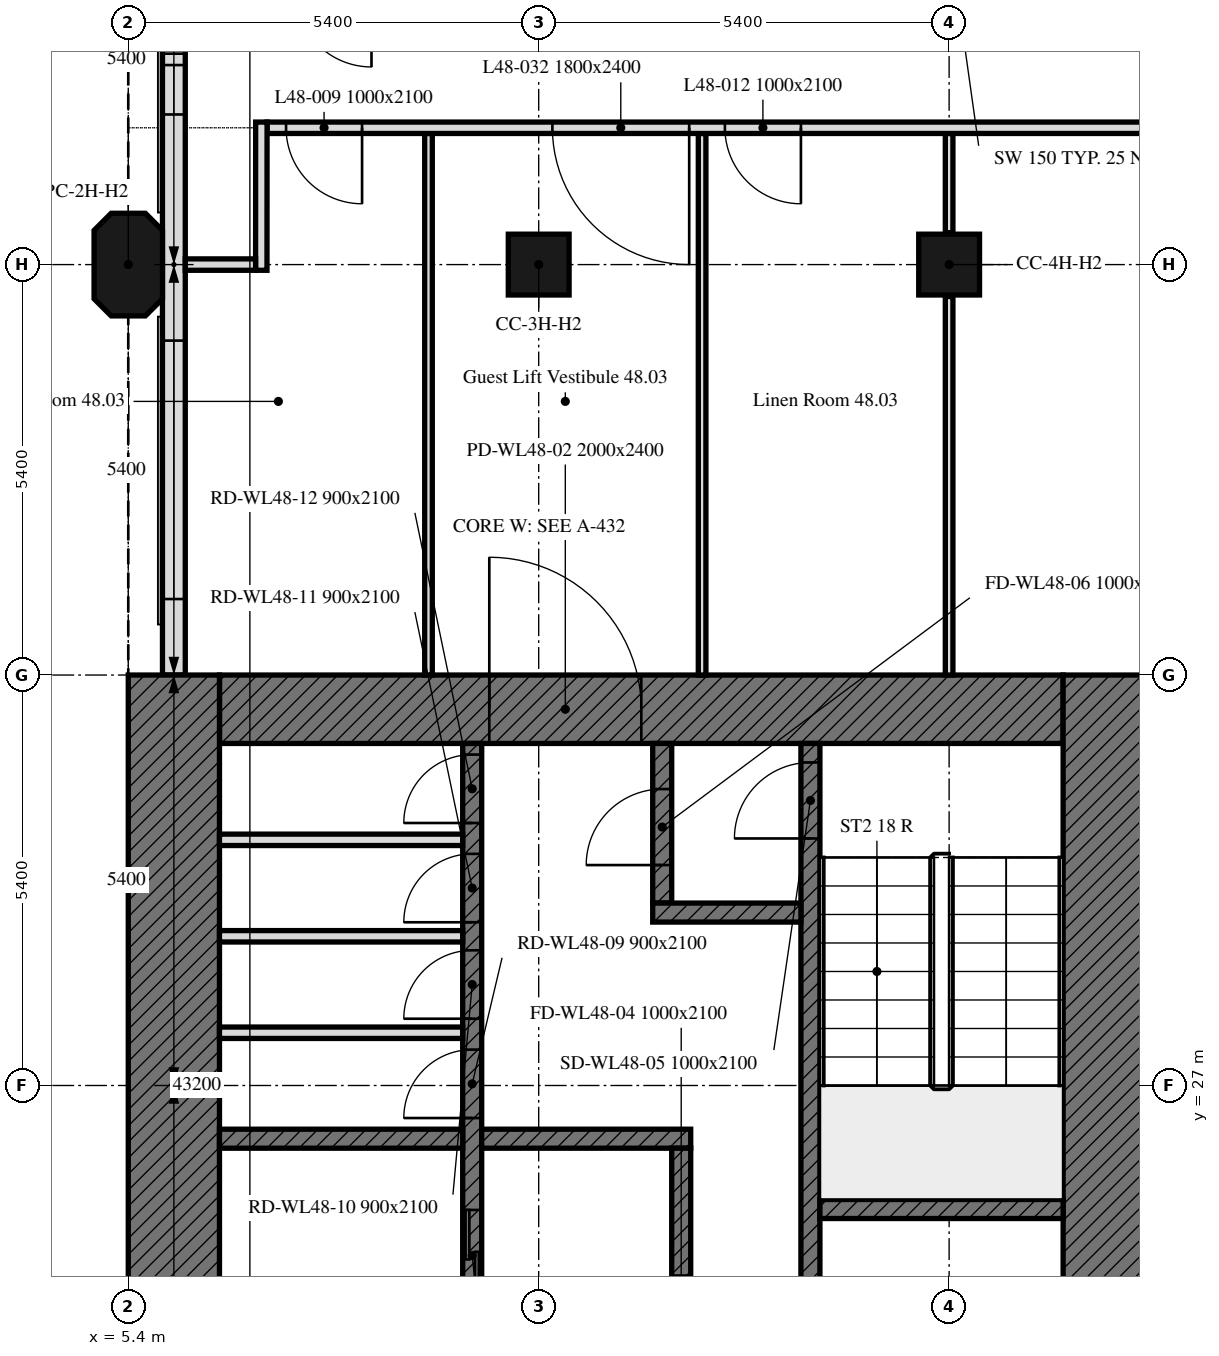
"""IFC4 building model, lengths in metres.
Left out: names, types, materials, properties, quantities, classifications, styles, units other than length and angle.
Written with IfcOpenShell. Run it as: python <this file> out.ifc"""

import sys

from ifc_helpers import new_model, si_unit, direction, frame, frame_2d, origin, origin_2d, place, context, subcontext, project, spatial, polyline, rectangle, outline, extrude, element, fill, save


model = new_model("IFC4")
c1 = context("Model", 3, precision=1e-05, world=origin(), true_north=direction((0.0, 1.0)))
c2 = subcontext(c1, "Body", "Model", "MODEL_VIEW")
j1 = project(units=[si_unit("LENGTHUNIT", "METRE"), si_unit("PLANEANGLEUNIT", "RADIAN")], contexts=[c1])
p1 = place(None, origin())
s1 = spatial("IfcSite", under=j1, at=p1, CompositionType="ELEMENT")
p2 = place(p1, origin())
s2 = spatial("IfcBuilding", under=s1, at=p2, CompositionType="ELEMENT")
p3 = place(p2, frame((0.0, 0.0, 197.2)))
s3 = spatial("IfcBuildingStorey", under=s2, at=p3, CompositionType="ELEMENT", Elevation=197.2)
p4 = place(p3, frame((5.4, 37.8, 0.0), z_axis=(0.0, 0.0, 1.0), x_axis=(0.0, 1.0, 0.0)))
e1 = element("IfcColumn", 1, at=p4, inside=s3, PredefinedType="COLUMN", context=c2, shape_type="SweptSolid", body=[
    extrude(outline(polyline([(-0.45, -0.45), (0.45, -0.45), (0.675, -0.225), (0.675, 0.225), (0.45, 0.45), (-0.45, 0.45), (-0.675, 0.225), (-0.675, -0.225), (-0.45, -0.45)])), origin(), (0.0, 0.0, 1.0), 3.0),
])
for number, where, z_axis, x_axis in (
    (2, (10.8, 37.8, 0.0), (0.0, 0.0, 1.0), (1.0, 0.0, 0.0)),
    (3, (16.2, 37.8, 0.0), (0.0, 0.0, 1.0), (1.0, 0.0, 0.0)),
):
    element("IfcColumn", number, at=place(p3, frame(where, z_axis=z_axis, x_axis=x_axis)), inside=s3, PredefinedType="COLUMN", context=c2, shape_type="SweptSolid", body=[
        extrude(rectangle(XDim=0.8, YDim=0.8, at=origin_2d()), origin(), (0.0, 0.0, 1.0), 3.0),
    ])
p5 = place(p3, frame((6.0, 43.014, 0.0), z_axis=(0.0, 0.0, 1.0), x_axis=(0.0, -1.0, 0.0)))
e4 = element("IfcWall", 4, at=p5, inside=s3, PredefinedType="SOLIDWALL", context=c2, shape_type="SweptSolid", body=[
    extrude(rectangle(XDim=10.614, YDim=0.3, at=frame_2d((5.307, 0.0))), origin(), (0.0, 0.0, 1.0), 3.0),
])
p6 = place(p5, frame((1.789, 0.0, 0.9)))
e5 = element("IfcOpeningElement", 5, at=p6, cuts=e4, PredefinedType="OPENING", context=c2, shape_type="SweptSolid", body=[
    extrude(rectangle(XDim=0.65, YDim=1.7, at=frame_2d((0.325, 0.85))), frame((0.0, 0.16, 0.0), z_axis=(0.0, -1.0, 0.0), x_axis=(1.0, 0.0, 0.0)), (0.0, 0.0, 1.0), 0.32),
])
p7 = place(p5, frame((2.589, 0.0, 0.9)))
e6 = element("IfcOpeningElement", 6, at=p7, cuts=e4, PredefinedType="OPENING", context=c2, shape_type="SweptSolid", body=[
    extrude(rectangle(XDim=0.65, YDim=1.7, at=frame_2d((0.325, 0.85))), frame((0.0, 0.16, 0.0), z_axis=(0.0, -1.0, 0.0), x_axis=(1.0, 0.0, 0.0)), (0.0, 0.0, 1.0), 0.32),
])
p8 = place(p5, frame((6.214, 0.0, 0.9)))
e7 = element("IfcOpeningElement", 7, at=p8, cuts=e4, PredefinedType="OPENING", context=c2, shape_type="SweptSolid", body=[
    extrude(rectangle(XDim=3.4, YDim=1.7, at=frame_2d((1.7, 0.85))), frame((0.0, 0.16, 0.0), z_axis=(0.0, -1.0, 0.0), x_axis=(1.0, 0.0, 0.0)), (0.0, 0.0, 1.0), 0.32),
])
p9 = place(p3, frame((6.6, 31.95, 0.0), z_axis=(0.0, 0.0, 1.0), x_axis=(1.0, 0.0, 0.0)))
e8 = element("IfcWall", 8, at=p9, inside=s3, PredefinedType="SOLIDWALL", context=c2, shape_type="SweptSolid", body=[
    extrude(rectangle(XDim=11.1, YDim=0.9, at=frame_2d((5.55, 0.0))), origin(), (0.0, 0.0, 1.0), 3.0),
])
p10 = place(p9, frame((3.55, 0.0, 0.0)))
e9 = element("IfcOpeningElement", 9, at=p10, cuts=e8, PredefinedType="OPENING", context=c2, shape_type="SweptSolid", body=[
    extrude(rectangle(XDim=2.0, YDim=2.4, at=frame_2d((1.0, 1.2))), frame((0.0, 0.45, 0.0), z_axis=(0.0, -1.0, 0.0), x_axis=(1.0, 0.0, 0.0)), (0.0, 0.0, 1.0), 0.9),
])
for number, where, z_axis, x_axis in (
    (10, (6.0, 16.2, 0.0), (0.0, 0.0, 1.0), (0.0, 1.0, 0.0)),
    (11, (18.3, 32.4, 0.0), (0.0, 0.0, 1.0), (0.0, -1.0, 0.0)),
):
    element("IfcWall", number, at=place(p3, frame(where, z_axis=z_axis, x_axis=x_axis)), inside=s3, PredefinedType="SOLIDWALL", context=c2, shape_type="SweptSolid", body=[
        extrude(rectangle(XDim=16.2, YDim=1.2, at=frame_2d((8.1, 0.0))), origin(), (0.0, 0.0, 1.0), 3.0),
    ])
p11 = place(p3, frame((9.925, 17.1, 0.0), z_axis=(0.0, 0.0, 1.0), x_axis=(0.0, 1.0, 0.0)))
e12 = element("IfcWall", 12, at=p11, inside=s3, PredefinedType="SOLIDWALL", context=c2, shape_type="SweptSolid", body=[
    extrude(rectangle(XDim=14.4, YDim=0.25, at=frame_2d((7.2, 0.0))), origin(), (0.0, 0.0, 1.0), 3.0),
])
p12 = place(p11, frame((4.6, 0.0, 0.0)))
e13 = element("IfcOpeningElement", 13, at=p12, cuts=e12, PredefinedType="OPENING", context=c2, shape_type="SweptSolid", body=[
    extrude(rectangle(XDim=1.0, YDim=2.1, at=frame_2d((0.5, 1.05))), frame((0.0, 0.125, 0.0), z_axis=(0.0, -1.0, 0.0), x_axis=(1.0, 0.0, 0.0)), (0.0, 0.0, 1.0), 0.25),
])
p13 = place(p11, frame((7.062, 0.0, 0.0)))
e14 = element("IfcOpeningElement", 14, at=p13, cuts=e12, PredefinedType="OPENING", context=c2, shape_type="SweptSolid", body=[
    extrude(rectangle(XDim=1.2, YDim=2.1, at=frame_2d((0.6, 1.05))), frame((0.0, 0.125, 0.0), z_axis=(0.0, -1.0, 0.0), x_axis=(1.0, 0.0, 0.0)), (0.0, 0.0, 1.0), 0.25),
])
p14 = place(p11, frame((9.472, 0.0, 0.0)))
e15 = element("IfcOpeningElement", 15, at=p14, cuts=e12, PredefinedType="OPENING", context=c2, shape_type="SweptSolid", body=[
    extrude(rectangle(XDim=0.9, YDim=2.1, at=frame_2d((0.45, 1.05))), frame((0.0, 0.125, 0.0), z_axis=(0.0, -1.0, 0.0), x_axis=(1.0, 0.0, 0.0)), (0.0, 0.0, 1.0), 0.25),
])
p15 = place(p11, frame((10.779, 0.0, 0.0)))
e16 = element("IfcOpeningElement", 16, at=p15, cuts=e12, PredefinedType="OPENING", context=c2, shape_type="SweptSolid", body=[
    extrude(rectangle(XDim=0.9, YDim=2.1, at=frame_2d((0.45, 1.05))), frame((0.0, 0.125, 0.0), z_axis=(0.0, -1.0, 0.0), x_axis=(1.0, 0.0, 0.0)), (0.0, 0.0, 1.0), 0.25),
])
p16 = place(p11, frame((12.048, 0.0, 0.0)))
e17 = element("IfcOpeningElement", 17, at=p16, cuts=e12, PredefinedType="OPENING", context=c2, shape_type="SweptSolid", body=[
    extrude(rectangle(XDim=0.9, YDim=2.1, at=frame_2d((0.45, 1.05))), frame((0.0, 0.125, 0.0), z_axis=(0.0, -1.0, 0.0), x_axis=(1.0, 0.0, 0.0)), (0.0, 0.0, 1.0), 0.25),
])
p17 = place(p11, frame((13.354, 0.0, 0.0)))
e18 = element("IfcOpeningElement", 18, at=p17, cuts=e12, PredefinedType="OPENING", context=c2, shape_type="SweptSolid", body=[
    extrude(rectangle(XDim=0.9, YDim=2.1, at=frame_2d((0.45, 1.05))), frame((0.0, 0.125, 0.0), z_axis=(0.0, -1.0, 0.0), x_axis=(1.0, 0.0, 0.0)), (0.0, 0.0, 1.0), 0.25),
])
p18 = place(p3, frame((14.375, 17.1, 0.0), z_axis=(0.0, 0.0, 1.0), x_axis=(0.0, 1.0, 0.0)))
e19 = element("IfcWall", 19, at=p18, inside=s3, PredefinedType="SOLIDWALL", context=c2, shape_type="SweptSolid", body=[
    extrude(rectangle(XDim=14.4, YDim=0.25, at=frame_2d((7.2, 0.0))), origin(), (0.0, 0.0, 1.0), 3.0),
])
p19 = place(p18, frame((13.15, 0.0, 0.0)))
e20 = element("IfcOpeningElement", 20, at=p19, cuts=e19, PredefinedType="OPENING", context=c2, shape_type="SweptSolid", body=[
    extrude(rectangle(XDim=1.0, YDim=2.1, at=frame_2d((0.5, 1.05))), frame((0.0, 0.125, 0.0), z_axis=(0.0, -1.0, 0.0), x_axis=(1.0, 0.0, 0.0)), (0.0, 0.0, 1.0), 0.25),
])
p20 = place(p18, frame((0.6, 0.0, 0.0)))
e21 = element("IfcOpeningElement", 21, at=p20, cuts=e19, PredefinedType="OPENING", context=c2, shape_type="SweptSolid", body=[
    extrude(rectangle(XDim=1.1, YDim=2.1, at=frame_2d((0.55, 1.05))), frame((0.0, 0.125, 0.0), z_axis=(0.0, -1.0, 0.0), x_axis=(1.0, 0.0, 0.0)), (0.0, 0.0, 1.0), 0.25),
])
p21 = place(p18, frame((3.25, 0.0, 0.0)))
e22 = element("IfcOpeningElement", 22, at=p21, cuts=e19, PredefinedType="OPENING", context=c2, shape_type="SweptSolid", body=[
    extrude(rectangle(XDim=0.9, YDim=2.1, at=frame_2d((0.45, 1.05))), frame((0.0, 0.125, 0.0), z_axis=(0.0, -1.0, 0.0), x_axis=(1.0, 0.0, 0.0)), (0.0, 0.0, 1.0), 0.25),
])
for number, where, z_axis, x_axis in (
    (23, (14.5, 25.375, 0.0), (0.0, 0.0, 1.0), (1.0, 0.0, 0.0)),
    (24, (6.6, 26.3, 0.0), (0.0, 0.0, 1.0), (1.0, 0.0, 0.0)),
):
    element("IfcWall", number, at=place(p3, frame(where, z_axis=z_axis, x_axis=x_axis)), inside=s3, PredefinedType="SOLIDWALL", context=c2, shape_type="SweptSolid", body=[
        extrude(rectangle(XDim=3.2, YDim=0.25, at=frame_2d((1.6, 0.0))), origin(), (0.0, 0.0, 1.0), 3.0),
    ])
p22 = place(p3, frame((10.05, 26.3, 0.0), z_axis=(0.0, 0.0, 1.0), x_axis=(1.0, 0.0, 0.0)))
e25 = element("IfcWall", 25, at=p22, inside=s3, PredefinedType="SOLIDWALL", context=c2, shape_type="SweptSolid", body=[
    extrude(rectangle(XDim=2.75, YDim=0.25, at=frame_2d((1.375, 0.0))), origin(), (0.0, 0.0, 1.0), 3.0),
])
p23 = place(p3, frame((12.425, 29.4, 0.0), z_axis=(0.0, 0.0, 1.0), x_axis=(0.0, 1.0, 0.0)))
e26 = element("IfcWall", 26, at=p23, inside=s3, PredefinedType="SOLIDWALL", context=c2, shape_type="SweptSolid", body=[
    extrude(rectangle(XDim=2.1, YDim=0.25, at=frame_2d((1.05, 0.0))), origin(), (0.0, 0.0, 1.0), 3.0),
])
p24 = place(p23, frame((0.5, 0.0, 0.0)))
e27 = element("IfcOpeningElement", 27, at=p24, cuts=e26, PredefinedType="OPENING", context=c2, shape_type="SweptSolid", body=[
    extrude(rectangle(XDim=1.0, YDim=2.1, at=frame_2d((0.5, 1.05))), frame((0.0, 0.125, 0.0), z_axis=(0.0, -1.0, 0.0), x_axis=(1.0, 0.0, 0.0)), (0.0, 0.0, 1.0), 0.25),
])
p25 = place(p3, frame((12.3, 29.275, 0.0), z_axis=(0.0, 0.0, 1.0), x_axis=(1.0, 0.0, 0.0)))
e28 = element("IfcWall", 28, at=p25, inside=s3, PredefinedType="SOLIDWALL", context=c2, shape_type="SweptSolid", body=[
    extrude(rectangle(XDim=1.95, YDim=0.25, at=frame_2d((0.975, 0.0))), origin(), (0.0, 0.0, 1.0), 3.0),
])
p26 = place(p3, frame((12.675, 20.55, 0.0), z_axis=(0.0, 0.0, 1.0), x_axis=(0.0, 1.0, 0.0)))
e29 = element("IfcWall", 29, at=p26, inside=s3, PredefinedType="SOLIDWALL", context=c2, shape_type="SweptSolid", body=[
    extrude(rectangle(XDim=5.625, YDim=0.25, at=frame_2d((2.812, 0.0))), origin(), (0.0, 0.0, 1.0), 3.0),
])
p27 = place(p26, frame((2.95, 0.0, 0.0)))
e30 = element("IfcOpeningElement", 30, at=p27, cuts=e29, PredefinedType="OPENING", context=c2, shape_type="SweptSolid", body=[
    extrude(rectangle(XDim=1.0, YDim=2.1, at=frame_2d((0.5, 1.05))), frame((0.0, 0.125, 0.0), z_axis=(0.0, -1.0, 0.0), x_axis=(1.0, 0.0, 0.0)), (0.0, 0.0, 1.0), 0.25),
])
for number, where, z_axis, x_axis in (
    (31, (6.6, 27.694, 0.0), (0.0, 0.0, 1.0), (1.0, 0.0, 0.0)),
    (32, (6.6, 28.963, 0.0), (0.0, 0.0, 1.0), (1.0, 0.0, 0.0)),
    (33, (6.6, 30.232, 0.0), (0.0, 0.0, 1.0), (1.0, 0.0, 0.0)),
):
    element("IfcWall", number, at=place(p3, frame(where, z_axis=z_axis, x_axis=x_axis)), inside=s3, PredefinedType="PARTITIONING", context=c2, shape_type="SweptSolid", body=[
        extrude(rectangle(XDim=3.2, YDim=0.15, at=frame_2d((1.6, 0.0))), origin(), (0.0, 0.0, 1.0), 3.0),
    ])
p28 = place(p3, frame((16.2, 39.525, 0.0), z_axis=(0.0, 0.0, 1.0), x_axis=(0.0, -1.0, 0.0)))
e34 = element("IfcWall", 34, at=p28, inside=s3, PredefinedType="PARTITIONING", context=c2, shape_type="SweptSolid", body=[
    extrude(rectangle(XDim=1.305, YDim=0.1, at=frame_2d((0.652, 0.0))), origin(), (0.0, 0.0, 1.0), 2.4),
])
p29 = place(p3, frame((16.2, 37.38, 0.0), z_axis=(0.0, 0.0, 1.0), x_axis=(0.0, -1.0, 0.0)))
e35 = element("IfcWall", 35, at=p29, inside=s3, PredefinedType="PARTITIONING", context=c2, shape_type="SweptSolid", body=[
    extrude(rectangle(XDim=4.98, YDim=0.1, at=frame_2d((2.49, 0.0))), origin(), (0.0, 0.0, 1.0), 2.4),
])
for number, where, z_axis, x_axis in (
    (36, (9.35, 39.525, 0.0), (0.0, 0.0, 1.0), (0.0, -1.0, 0.0)),
    (37, (12.95, 32.4, 0.0), (0.0, 0.0, 1.0), (0.0, 1.0, 0.0)),
):
    element("IfcWall", number, at=place(p3, frame(where, z_axis=z_axis, x_axis=x_axis)), inside=s3, PredefinedType="PARTITIONING", context=c2, shape_type="SweptSolid", body=[
        extrude(rectangle(XDim=7.125, YDim=0.1, at=frame_2d((3.562, 0.0))), origin(), (0.0, 0.0, 1.0), 3.0),
    ])
p30 = place(p3, frame((43.275, 39.6, 0.0), z_axis=(0.0, 0.0, 1.0), x_axis=(-1.0, 0.0, 0.0)))
e38 = element("IfcWall", 38, at=p30, inside=s3, PredefinedType="PARTITIONING", context=c2, shape_type="SweptSolid", body=[
    extrude(rectangle(XDim=36.049, YDim=0.15, at=frame_2d((18.024, 0.0))), origin(), (0.0, 0.0, 1.0), 2.4),
])
p31 = place(p30, frame((18.475, 0.0, 0.0)))
e39 = element("IfcOpeningElement", 39, at=p31, cuts=e38, PredefinedType="OPENING", context=c2, shape_type="SweptSolid", body=[
    extrude(rectangle(XDim=1.0, YDim=2.1, at=frame_2d((0.5, 1.05))), frame((0.0, 0.075, 0.0), z_axis=(0.0, -1.0, 0.0), x_axis=(1.0, 0.0, 0.0)), (0.0, 0.0, 1.0), 0.15),
])
p32 = place(p30, frame((34.799, 0.0, 0.0)))
e40 = element("IfcOpeningElement", 40, at=p32, cuts=e38, PredefinedType="OPENING", context=c2, shape_type="SweptSolid", body=[
    extrude(rectangle(XDim=1.0, YDim=2.1, at=frame_2d((0.5, 1.05))), frame((0.0, 0.075, 0.0), z_axis=(0.0, -1.0, 0.0), x_axis=(1.0, 0.0, 0.0)), (0.0, 0.0, 1.0), 0.15),
])
p33 = place(p30, frame((7.925, 0.0, 0.0)))
e41 = element("IfcOpeningElement", 41, at=p33, cuts=e38, PredefinedType="OPENING", context=c2, shape_type="SweptSolid", body=[
    extrude(rectangle(XDim=1.0, YDim=2.1, at=frame_2d((0.5, 1.05))), frame((0.0, 0.075, 0.0), z_axis=(0.0, -1.0, 0.0), x_axis=(1.0, 0.0, 0.0)), (0.0, 0.0, 1.0), 0.15),
])
p34 = place(p30, frame((29.025, 0.0, 0.0)))
e42 = element("IfcOpeningElement", 42, at=p34, cuts=e38, PredefinedType="OPENING", context=c2, shape_type="SweptSolid", body=[
    extrude(rectangle(XDim=1.0, YDim=2.1, at=frame_2d((0.5, 1.05))), frame((0.0, 0.075, 0.0), z_axis=(0.0, -1.0, 0.0), x_axis=(1.0, 0.0, 0.0)), (0.0, 0.0, 1.0), 0.15),
])
p35 = place(p30, frame((30.495, 0.0, 0.0)))
e43 = element("IfcOpeningElement", 43, at=p35, cuts=e38, PredefinedType="OPENING", context=c2, shape_type="SweptSolid", body=[
    extrude(rectangle(XDim=1.8, YDim=2.4, at=frame_2d((0.9, 1.2))), frame((0.0, 0.075, 0.0), z_axis=(0.0, -1.0, 0.0), x_axis=(1.0, 0.0, 0.0)), (0.0, 0.0, 1.0), 0.15),
])
p36 = place(p30, frame((5.925, 0.0, 0.0)))
e44 = element("IfcOpeningElement", 44, at=p36, cuts=e38, PredefinedType="OPENING", context=c2, shape_type="SweptSolid", body=[
    extrude(rectangle(XDim=1.0, YDim=2.1, at=frame_2d((0.5, 1.05))), frame((0.0, 0.075, 0.0), z_axis=(0.0, -1.0, 0.0), x_axis=(1.0, 0.0, 0.0)), (0.0, 0.0, 1.0), 0.15),
])
p37 = place(p3, frame((7.151, 39.675, 0.0), z_axis=(0.0, 0.0, 1.0), x_axis=(-0.00050081376, -0.999999874593, 0.0)))
e45 = element("IfcWall", 45, at=p37, inside=s3, PredefinedType="PARTITIONING", context=c2, shape_type="SweptSolid", body=[
    extrude(rectangle(XDim=1.95, YDim=0.15, at=frame_2d((0.975, 0.0))), origin(), (0.0, 0.0, 1.0), 3.0),
])
p38 = place(p3, frame((7.075, 37.8, 0.0), z_axis=(0.0, 0.0, 1.0), x_axis=(-1.0, 0.0, 0.0)))
e46 = element("IfcWall", 46, at=p38, inside=s3, PredefinedType="PARTITIONING", context=c2, shape_type="SweptSolid", body=[
    extrude(rectangle(XDim=0.925, YDim=0.15, at=frame_2d((0.462, 0.0))), origin(), (0.0, 0.0, 1.0), 3.0),
])
p39 = place(p6, origin())
e47 = element("IfcWindow", 47, at=p39, inside=s3, PartitioningType="SINGLE_PANEL", PredefinedType="WINDOW", context=c2, shape_type="SweptSolid", body=[
    extrude(rectangle(XDim=0.65, YDim=1.7, at=frame_2d((0.325, 0.85))), frame((0.0, 0.03, 0.0), z_axis=(0.0, -1.0, 0.0), x_axis=(1.0, 0.0, 0.0)), (0.0, 0.0, 1.0), 0.06),
])
fill(e5, e47)
p40 = place(p7, origin())
e48 = element("IfcWindow", 48, at=p40, inside=s3, PartitioningType="SINGLE_PANEL", PredefinedType="WINDOW", context=c2, shape_type="SweptSolid", body=[
    extrude(rectangle(XDim=0.65, YDim=1.7, at=frame_2d((0.325, 0.85))), frame((0.0, 0.03, 0.0), z_axis=(0.0, -1.0, 0.0), x_axis=(1.0, 0.0, 0.0)), (0.0, 0.0, 1.0), 0.06),
])
fill(e6, e48)
p41 = place(p8, origin())
e49 = element("IfcWindow", 49, at=p41, inside=s3, PartitioningType="SINGLE_PANEL", PredefinedType="WINDOW", context=c2, shape_type="SweptSolid", body=[
    extrude(rectangle(XDim=3.4, YDim=1.7, at=frame_2d((1.7, 0.85))), frame((0.0, 0.03, 0.0), z_axis=(0.0, -1.0, 0.0), x_axis=(1.0, 0.0, 0.0)), (0.0, 0.0, 1.0), 0.06),
])
fill(e7, e49)
p42 = place(p10, origin())
e50 = element("IfcDoor", 50, at=p42, inside=s3, OperationType="DOUBLE_DOOR_SINGLE_SWING", PredefinedType="DOOR", context=c2, shape_type="SweptSolid", body=[
    extrude(rectangle(XDim=2.0, YDim=2.4, at=frame_2d((1.0, 1.2))), frame((0.0, 0.025, 0.0), z_axis=(0.0, -1.0, 0.0), x_axis=(1.0, 0.0, 0.0)), (0.0, 0.0, 1.0), 0.05),
])
fill(e9, e50)
p43 = place(p19, origin())
e51 = element("IfcDoor", 51, at=p43, inside=s3, OperationType="SINGLE_SWING_LEFT", PredefinedType="DOOR", context=c2, shape_type="SweptSolid", body=[
    extrude(rectangle(XDim=1.0, YDim=2.1, at=frame_2d((0.5, 1.05))), frame((0.0, 0.025, 0.0), z_axis=(0.0, -1.0, 0.0), x_axis=(1.0, 0.0, 0.0)), (0.0, 0.0, 1.0), 0.05),
])
fill(e20, e51)
p44 = place(p24, origin())
e52 = element("IfcDoor", 52, at=p44, inside=s3, OperationType="SINGLE_SWING_LEFT", PredefinedType="DOOR", context=c2, shape_type="SweptSolid", body=[
    extrude(rectangle(XDim=1.0, YDim=2.1, at=frame_2d((0.5, 1.05))), frame((0.0, 0.025, 0.0), z_axis=(0.0, -1.0, 0.0), x_axis=(1.0, 0.0, 0.0)), (0.0, 0.0, 1.0), 0.05),
])
fill(e27, e52)
p45 = place(p13, origin())
e53 = element("IfcDoor", 53, at=p45, inside=s3, OperationType="DOUBLE_DOOR_SLIDING", PredefinedType="DOOR", context=c2, shape_type="SweptSolid", body=[
    extrude(rectangle(XDim=1.2, YDim=2.1, at=frame_2d((0.6, 1.05))), frame((0.0, 0.025, 0.0), z_axis=(0.0, -1.0, 0.0), x_axis=(1.0, 0.0, 0.0)), (0.0, 0.0, 1.0), 0.05),
])
fill(e14, e53)
p46 = place(p14, origin())
e54 = element("IfcDoor", 54, at=p46, inside=s3, OperationType="SINGLE_SWING_LEFT", PredefinedType="DOOR", context=c2, shape_type="SweptSolid", body=[
    extrude(rectangle(XDim=0.9, YDim=2.1, at=frame_2d((0.45, 1.05))), frame((0.0, 0.025, 0.0), z_axis=(0.0, -1.0, 0.0), x_axis=(1.0, 0.0, 0.0)), (0.0, 0.0, 1.0), 0.05),
])
fill(e15, e54)
p47 = place(p15, origin())
e55 = element("IfcDoor", 55, at=p47, inside=s3, OperationType="SINGLE_SWING_LEFT", PredefinedType="DOOR", context=c2, shape_type="SweptSolid", body=[
    extrude(rectangle(XDim=0.9, YDim=2.1, at=frame_2d((0.45, 1.05))), frame((0.0, 0.025, 0.0), z_axis=(0.0, -1.0, 0.0), x_axis=(1.0, 0.0, 0.0)), (0.0, 0.0, 1.0), 0.05),
])
fill(e16, e55)
p48 = place(p16, origin())
e56 = element("IfcDoor", 56, at=p48, inside=s3, OperationType="SINGLE_SWING_LEFT", PredefinedType="DOOR", context=c2, shape_type="SweptSolid", body=[
    extrude(rectangle(XDim=0.9, YDim=2.1, at=frame_2d((0.45, 1.05))), frame((0.0, 0.025, 0.0), z_axis=(0.0, -1.0, 0.0), x_axis=(1.0, 0.0, 0.0)), (0.0, 0.0, 1.0), 0.05),
])
fill(e17, e56)
p49 = place(p17, origin())
e57 = element("IfcDoor", 57, at=p49, inside=s3, OperationType="SINGLE_SWING_LEFT", PredefinedType="DOOR", context=c2, shape_type="SweptSolid", body=[
    extrude(rectangle(XDim=0.9, YDim=2.1, at=frame_2d((0.45, 1.05))), frame((0.0, 0.025, 0.0), z_axis=(0.0, -1.0, 0.0), x_axis=(1.0, 0.0, 0.0)), (0.0, 0.0, 1.0), 0.05),
])
fill(e18, e57)
p50 = place(p32, origin())
e58 = element("IfcDoor", 58, at=p50, inside=s3, OperationType="SINGLE_SWING_RIGHT", PredefinedType="DOOR", context=c2, shape_type="SweptSolid", body=[
    extrude(rectangle(XDim=1.0, YDim=2.1, at=frame_2d((0.5, 1.05))), frame((0.0, 0.025, 0.0), z_axis=(0.0, -1.0, 0.0), x_axis=(1.0, 0.0, 0.0)), (0.0, 0.0, 1.0), 0.05),
])
fill(e40, e58)
p51 = place(p34, origin())
e59 = element("IfcDoor", 59, at=p51, inside=s3, OperationType="SINGLE_SWING_LEFT", PredefinedType="DOOR", context=c2, shape_type="SweptSolid", body=[
    extrude(rectangle(XDim=1.0, YDim=2.1, at=frame_2d((0.5, 1.05))), frame((0.0, 0.025, 0.0), z_axis=(0.0, -1.0, 0.0), x_axis=(1.0, 0.0, 0.0)), (0.0, 0.0, 1.0), 0.05),
])
fill(e42, e59)
p52 = place(p35, origin())
e60 = element("IfcDoor", 60, at=p52, inside=s3, OperationType="DOUBLE_DOOR_SINGLE_SWING", PredefinedType="DOOR", context=c2, shape_type="SweptSolid", body=[
    extrude(rectangle(XDim=1.8, YDim=2.4, at=frame_2d((0.9, 1.2))), frame((0.0, 0.025, 0.0), z_axis=(0.0, -1.0, 0.0), x_axis=(1.0, 0.0, 0.0)), (0.0, 0.0, 1.0), 0.05),
])
fill(e43, e60)
save(model, sys.argv[1])
